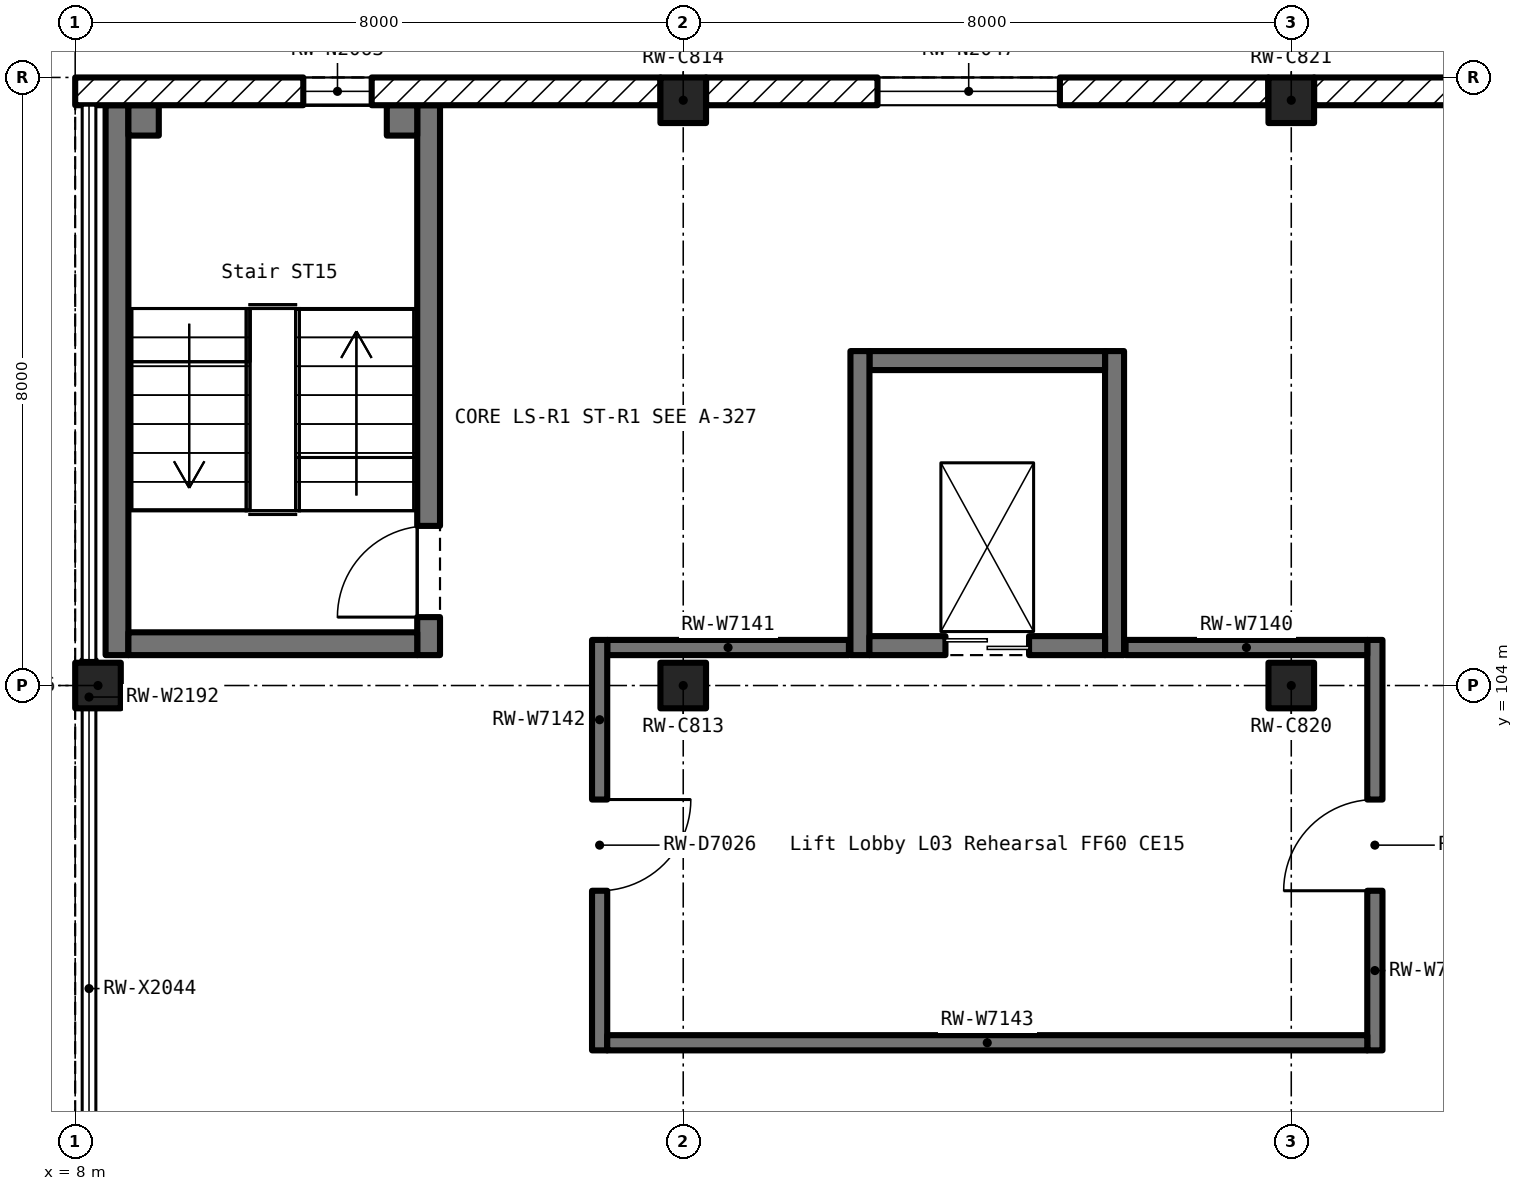
"""IFC4 building model, lengths in metres.
Left out: names, types, materials, properties, quantities, classifications, styles, units other than length and angle.
Written with IfcOpenShell. Run it as: python <this file> out.ifc"""

import sys

from ifc_helpers import new_model, si_unit, direction, frame, frame_2d, origin, origin_2d, place, context, subcontext, project, spatial, rectangle, extrude, element, fill, save


model = new_model("IFC4")
c1 = context("Model", 3, precision=1e-05, world=origin(), true_north=direction((0.0, 1.0)))
c2 = subcontext(c1, "Body", "Model", "MODEL_VIEW")
j1 = project(units=[si_unit("LENGTHUNIT", "METRE"), si_unit("PLANEANGLEUNIT", "RADIAN")], contexts=[c1])
p1 = place(None, origin())
s1 = spatial("IfcSite", under=j1, at=p1, CompositionType="ELEMENT")
p2 = place(p1, origin())
s2 = spatial("IfcBuilding", under=s1, at=p2, CompositionType="ELEMENT")
p3 = place(p2, frame((0.0, 0.0, 17.0)))
s3 = spatial("IfcBuildingStorey", under=s2, at=p3, CompositionType="ELEMENT", Elevation=17.0)
for number, where, z_axis, x_axis in (
    (1, (8.3, 104.0, 0.0), (0.0, 0.0, 1.0), (1.0, 0.0, 0.0)),
    (2, (16.0, 104.0, 0.0), (0.0, 0.0, 1.0), (1.0, 0.0, 0.0)),
    (3, (16.0, 111.7, 0.0), (0.0, 0.0, 1.0), (1.0, 0.0, 0.0)),
    (4, (24.0, 104.0, 0.0), (0.0, 0.0, 1.0), (1.0, 0.0, 0.0)),
    (5, (24.0, 111.7, 0.0), (0.0, 0.0, 1.0), (1.0, 0.0, 0.0)),
):
    element("IfcColumn", number, at=place(p3, frame(where, z_axis=z_axis, x_axis=x_axis)), inside=s3, PredefinedType="COLUMN", context=c2, shape_type="SweptSolid", body=[
        extrude(rectangle(XDim=0.6, YDim=0.6, at=origin_2d()), origin(), (0.0, 0.0, 1.0), 5.5),
    ])
p4 = place(p3, frame((30.817, 111.817, 0.0), z_axis=(0.0, 0.0, 1.0), x_axis=(-1.0, 0.0, 0.0)))
e6 = element("IfcWall", 6, at=p4, inside=s3, PredefinedType="SOLIDWALL", context=c2, shape_type="SweptSolid", body=[
    extrude(rectangle(XDim=6.517, YDim=0.365, at=frame_2d((3.258, 0.0))), origin(), (0.0, 0.0, 1.0), 4.55),
])
p5 = place(p4, frame((2.059, 0.0, 1.0)))
e7 = element("IfcOpeningElement", 7, at=p5, cuts=e6, PredefinedType="OPENING", context=c2, shape_type="SweptSolid", body=[
    extrude(rectangle(XDim=2.4, YDim=2.0, at=frame_2d((1.2, 1.0))), frame((0.0, 0.195, 0.0), z_axis=(0.0, -1.0, 0.0), x_axis=(1.0, 0.0, 0.0)), (0.0, 0.0, 1.0), 0.389),
])
p6 = place(p3, frame((23.697, 111.817, 0.0), z_axis=(0.0, 0.0, 1.0), x_axis=(-1.0, 0.0, 0.0)))
e8 = element("IfcWall", 8, at=p6, inside=s3, PredefinedType="SOLIDWALL", context=c2, shape_type="SweptSolid", body=[
    extrude(rectangle(XDim=7.397, YDim=0.365, at=frame_2d((3.698, 0.0))), origin(), (0.0, 0.0, 1.0), 4.55),
])
p7 = place(p6, frame((2.741, 0.0, 1.0)))
e9 = element("IfcOpeningElement", 9, at=p7, cuts=e8, PredefinedType="OPENING", context=c2, shape_type="SweptSolid", body=[
    extrude(rectangle(XDim=2.4, YDim=2.0, at=frame_2d((1.2, 1.0))), frame((0.0, 0.195, 0.0), z_axis=(0.0, -1.0, 0.0), x_axis=(1.0, 0.0, 0.0)), (0.0, 0.0, 1.0), 0.389),
])
p8 = place(p3, frame((15.701, 111.817, 0.0), z_axis=(0.0, 0.0, 1.0), x_axis=(-1.0, 0.0, 0.0)))
e10 = element("IfcWall", 10, at=p8, inside=s3, PredefinedType="SOLIDWALL", context=c2, shape_type="SweptSolid", body=[
    extrude(rectangle(XDim=7.701, YDim=0.365, at=frame_2d((3.851, 0.0))), origin(), (0.0, 0.0, 1.0), 4.55),
])
p9 = place(p8, frame((3.8, 0.0, 1.0)))
e11 = element("IfcOpeningElement", 11, at=p9, cuts=e10, PredefinedType="OPENING", context=c2, shape_type="SweptSolid", body=[
    extrude(rectangle(XDim=0.9, YDim=2.0, at=frame_2d((0.45, 1.0))), frame((0.0, 0.195, 0.0), z_axis=(0.0, -1.0, 0.0), x_axis=(1.0, 0.0, 0.0)), (0.0, 0.0, 1.0), 0.389),
])
p10 = place(p3, frame((12.65, 104.4, 0.0), z_axis=(0.0, 0.0, 1.0), x_axis=(0.0, 1.0, 0.0)))
e12 = element("IfcWall", 12, at=p10, inside=s3, PredefinedType="SOLIDWALL", context=c2, shape_type="SweptSolid", body=[
    extrude(rectangle(XDim=7.235, YDim=0.3, at=frame_2d((3.618, 0.0))), origin(), (0.0, 0.0, 1.0), 5.5),
])
p11 = place(p10, frame((0.5, 0.0, 0.0)))
e13 = element("IfcOpeningElement", 13, at=p11, cuts=e12, PredefinedType="OPENING", context=c2, shape_type="SweptSolid", body=[
    extrude(rectangle(XDim=1.2, YDim=2.1, at=frame_2d((0.6, 1.05))), frame((0.0, 0.162, 0.0), z_axis=(0.0, -1.0, 0.0), x_axis=(1.0, 0.0, 0.0)), (0.0, 0.0, 1.0), 0.324),
])
p12 = place(p3, frame((8.55, 111.635, 0.0), z_axis=(0.0, 0.0, 1.0), x_axis=(0.0, -1.0, 0.0)))
e14 = element("IfcWall", 14, at=p12, inside=s3, PredefinedType="SOLIDWALL", context=c2, shape_type="SweptSolid", body=[
    extrude(rectangle(XDim=7.235, YDim=0.3, at=frame_2d((3.618, 0.0))), origin(), (0.0, 0.0, 1.0), 5.5),
])
p13 = place(p3, frame((8.7, 104.55, 0.0), z_axis=(0.0, 0.0, 1.0), x_axis=(1.0, 0.0, 0.0)))
e15 = element("IfcWall", 15, at=p13, inside=s3, PredefinedType="SOLIDWALL", context=c2, shape_type="SweptSolid", body=[
    extrude(rectangle(XDim=3.8, YDim=0.3, at=frame_2d((1.9, 0.0))), origin(), (0.0, 0.0, 1.0), 5.5),
])
p14 = place(p3, frame((12.5, 111.435, 0.0), z_axis=(0.0, 0.0, 1.0), x_axis=(-1.0, 0.0, 0.0)))
e16 = element("IfcWall", 16, at=p14, inside=s3, PredefinedType="SOLIDWALL", context=c2, shape_type="SweptSolid", body=[
    extrude(rectangle(XDim=0.4, YDim=0.4, at=frame_2d((0.2, 0.0))), origin(), (0.0, 0.0, 1.0), 5.5),
])
p15 = place(p3, frame((9.1, 111.435, 0.0), z_axis=(0.0, 0.0, 1.0), x_axis=(-1.0, 0.0, 0.0)))
e17 = element("IfcWall", 17, at=p15, inside=s3, PredefinedType="SOLIDWALL", context=c2, shape_type="SweptSolid", body=[
    extrude(rectangle(XDim=0.4, YDim=0.4, at=frame_2d((0.2, 0.0))), origin(), (0.0, 0.0, 1.0), 5.5),
])
p16 = place(p3, frame((21.675, 104.4, 0.0), z_axis=(0.0, 0.0, 1.0), x_axis=(0.0, 1.0, 0.0)))
e18 = element("IfcWall", 18, at=p16, inside=s3, PredefinedType="SOLIDWALL", context=c2, shape_type="SweptSolid", body=[
    extrude(rectangle(XDim=4.0, YDim=0.25, at=frame_2d((2.0, 0.0))), origin(), (0.0, 0.0, 1.0), 5.5),
])
p17 = place(p3, frame((21.55, 108.275, 0.0), z_axis=(0.0, 0.0, 1.0), x_axis=(-1.0, 0.0, 0.0)))
e19 = element("IfcWall", 19, at=p17, inside=s3, PredefinedType="SOLIDWALL", context=c2, shape_type="SweptSolid", body=[
    extrude(rectangle(XDim=3.1, YDim=0.25, at=frame_2d((1.55, 0.0))), origin(), (0.0, 0.0, 1.0), 5.5),
])
p18 = place(p3, frame((18.325, 108.4, 0.0), z_axis=(0.0, 0.0, 1.0), x_axis=(0.0, -1.0, 0.0)))
e20 = element("IfcWall", 20, at=p18, inside=s3, PredefinedType="SOLIDWALL", context=c2, shape_type="SweptSolid", body=[
    extrude(rectangle(XDim=4.0, YDim=0.25, at=frame_2d((2.0, 0.0))), origin(), (0.0, 0.0, 1.0), 5.5),
])
p19 = place(p3, frame((18.45, 104.525, 0.0), z_axis=(0.0, 0.0, 1.0), x_axis=(1.0, 0.0, 0.0)))
e21 = element("IfcWall", 21, at=p19, inside=s3, PredefinedType="SOLIDWALL", context=c2, shape_type="SweptSolid", body=[
    extrude(rectangle(XDim=3.1, YDim=0.25, at=frame_2d((1.55, 0.0))), origin(), (0.0, 0.0, 1.0), 5.5),
])
p20 = place(p19, frame((1.0, 0.0, 0.0)))
e22 = element("IfcOpeningElement", 22, at=p20, cuts=e21, PredefinedType="OPENING", context=c2, shape_type="SweptSolid", body=[
    extrude(rectangle(XDim=1.1, YDim=2.1, at=frame_2d((0.55, 1.05))), frame((0.0, 0.137, 0.0), z_axis=(0.0, -1.0, 0.0), x_axis=(1.0, 0.0, 0.0)), (0.0, 0.0, 1.0), 0.274),
])
p21 = place(p3, frame((25.1, 99.2, 0.0), z_axis=(0.0, 0.0, 1.0), x_axis=(0.0, 1.0, 0.0)))
e23 = element("IfcWall", 23, at=p21, inside=s3, PredefinedType="PARTITIONING", context=c2, shape_type="SweptSolid", body=[
    extrude(rectangle(XDim=5.4, YDim=0.2, at=frame_2d((2.7, 0.0))), origin(), (0.0, 0.0, 1.0), 5.35),
])
p22 = place(p21, frame((2.1, 0.0, 0.0)))
e24 = element("IfcOpeningElement", 24, at=p22, cuts=e23, PredefinedType="OPENING", context=c2, shape_type="SweptSolid", body=[
    extrude(rectangle(XDim=1.2, YDim=2.1, at=frame_2d((0.6, 1.05))), frame((0.0, 0.112, 0.0), z_axis=(0.0, -1.0, 0.0), x_axis=(1.0, 0.0, 0.0)), (0.0, 0.0, 1.0), 0.224),
])
for number, where, z_axis, x_axis in (
    (25, (25.0, 104.5, 0.0), (0.0, 0.0, 1.0), (-1.0, 0.0, 0.0)),
    (26, (18.18, 104.5, 0.0), (0.0, 0.0, 1.0), (-1.0, 0.0, 0.0)),
):
    element("IfcWall", number, at=place(p3, frame(where, z_axis=z_axis, x_axis=x_axis)), inside=s3, PredefinedType="PARTITIONING", context=c2, shape_type="SweptSolid", body=[
        extrude(rectangle(XDim=3.18, YDim=0.2, at=frame_2d((1.59, 0.0))), origin(), (0.0, 0.0, 1.0), 5.35),
    ])
p23 = place(p3, frame((14.9, 104.6, 0.0), z_axis=(0.0, 0.0, 1.0), x_axis=(0.0, -1.0, 0.0)))
e27 = element("IfcWall", 27, at=p23, inside=s3, PredefinedType="PARTITIONING", context=c2, shape_type="SweptSolid", body=[
    extrude(rectangle(XDim=5.4, YDim=0.2, at=frame_2d((2.7, 0.0))), origin(), (0.0, 0.0, 1.0), 5.35),
])
p24 = place(p23, frame((2.1, 0.0, 0.0)))
e28 = element("IfcOpeningElement", 28, at=p24, cuts=e27, PredefinedType="OPENING", context=c2, shape_type="SweptSolid", body=[
    extrude(rectangle(XDim=1.2, YDim=2.1, at=frame_2d((0.6, 1.05))), frame((0.0, 0.112, 0.0), z_axis=(0.0, -1.0, 0.0), x_axis=(1.0, 0.0, 0.0)), (0.0, 0.0, 1.0), 0.224),
])
p25 = place(p3, frame((15.0, 99.3, 0.0), z_axis=(0.0, 0.0, 1.0), x_axis=(1.0, 0.0, 0.0)))
e29 = element("IfcWall", 29, at=p25, inside=s3, PredefinedType="PARTITIONING", context=c2, shape_type="SweptSolid", body=[
    extrude(rectangle(XDim=10.0, YDim=0.2, at=frame_2d((5.0, 0.0))), origin(), (0.0, 0.0, 1.0), 5.35),
])
p26 = place(p3, frame((8.182, 104.33, 0.0), z_axis=(0.0, 0.0, 1.0), x_axis=(0.0, -1.0, 0.0)))
e30 = element("IfcWall", 30, at=p26, inside=s3, PredefinedType="SOLIDWALL", context=c2, shape_type="SweptSolid", body=[
    extrude(rectangle(XDim=0.305, YDim=0.18, at=frame_2d((0.153, 0.0))), origin(), (0.0, 0.0, 1.0), 3.7),
])
p27 = place(p3, frame((8.182, 103.696, 0.0), z_axis=(0.0, 0.0, 1.0), x_axis=(0.0, 1.0, 0.0)))
e31 = element("IfcWall", 31, at=p27, inside=s3, PredefinedType="SOLIDWALL", context=c2, shape_type="SweptSolid", body=[
    extrude(rectangle(XDim=0.305, YDim=0.18, at=frame_2d((0.152, 0.0))), origin(), (0.0, 0.0, 1.0), 3.7),
])
p28 = place(p7, origin())
e32 = element("IfcWindow", 32, at=p28, inside=s3, PartitioningType="DOUBLE_PANEL_VERTICAL", PredefinedType="WINDOW", context=c2, shape_type="SweptSolid", body=[
    extrude(rectangle(XDim=2.4, YDim=2.0, at=frame_2d((1.2, 1.0))), frame((0.0, 0.03, 0.0), z_axis=(0.0, -1.0, 0.0), x_axis=(1.0, 0.0, 0.0)), (0.0, 0.0, 1.0), 0.06),
])
fill(e9, e32)
p29 = place(p11, origin())
e33 = element("IfcDoor", 33, at=p29, inside=s3, OperationType="SINGLE_SWING_LEFT", PredefinedType="DOOR", context=c2, shape_type="SweptSolid", body=[
    extrude(rectangle(XDim=1.2, YDim=2.1, at=frame_2d((0.6, 1.05))), frame((0.0, 0.025, 0.0), z_axis=(0.0, -1.0, 0.0), x_axis=(1.0, 0.0, 0.0)), (0.0, 0.0, 1.0), 0.05),
])
fill(e13, e33)
p30 = place(p20, origin())
e34 = element("IfcDoor", 34, at=p30, inside=s3, OperationType="DOUBLE_DOOR_SLIDING", PredefinedType="DOOR", context=c2, shape_type="SweptSolid", body=[
    extrude(rectangle(XDim=1.1, YDim=2.1, at=frame_2d((0.55, 1.05))), frame((0.0, 0.025, 0.0), z_axis=(0.0, -1.0, 0.0), x_axis=(1.0, 0.0, 0.0)), (0.0, 0.0, 1.0), 0.05),
])
fill(e22, e34)
p31 = place(p22, origin())
e35 = element("IfcDoor", 35, at=p31, inside=s3, OperationType="SINGLE_SWING_LEFT", PredefinedType="DOOR", context=c2, shape_type="SweptSolid", body=[
    extrude(rectangle(XDim=1.2, YDim=2.1, at=frame_2d((0.6, 1.05))), frame((0.0, 0.025, 0.0), z_axis=(0.0, -1.0, 0.0), x_axis=(1.0, 0.0, 0.0)), (0.0, 0.0, 1.0), 0.05),
])
fill(e24, e35)
p32 = place(p24, origin())
e36 = element("IfcDoor", 36, at=p32, inside=s3, OperationType="SINGLE_SWING_LEFT", PredefinedType="DOOR", context=c2, shape_type="SweptSolid", body=[
    extrude(rectangle(XDim=1.2, YDim=2.1, at=frame_2d((0.6, 1.05))), frame((0.0, 0.025, 0.0), z_axis=(0.0, -1.0, 0.0), x_axis=(1.0, 0.0, 0.0)), (0.0, 0.0, 1.0), 0.05),
])
fill(e28, e36)
p33 = place(p9, origin())
e37 = element("IfcWindow", 37, at=p33, inside=s3, PartitioningType="SINGLE_PANEL", PredefinedType="WINDOW", context=c2, shape_type="SweptSolid", body=[
    extrude(rectangle(XDim=0.9, YDim=2.0, at=frame_2d((0.45, 1.0))), frame((0.0, 0.03, 0.0), z_axis=(0.0, -1.0, 0.0), x_axis=(1.0, 0.0, 0.0)), (0.0, 0.0, 1.0), 0.06),
])
fill(e11, e37)
save(model, sys.argv[1])
